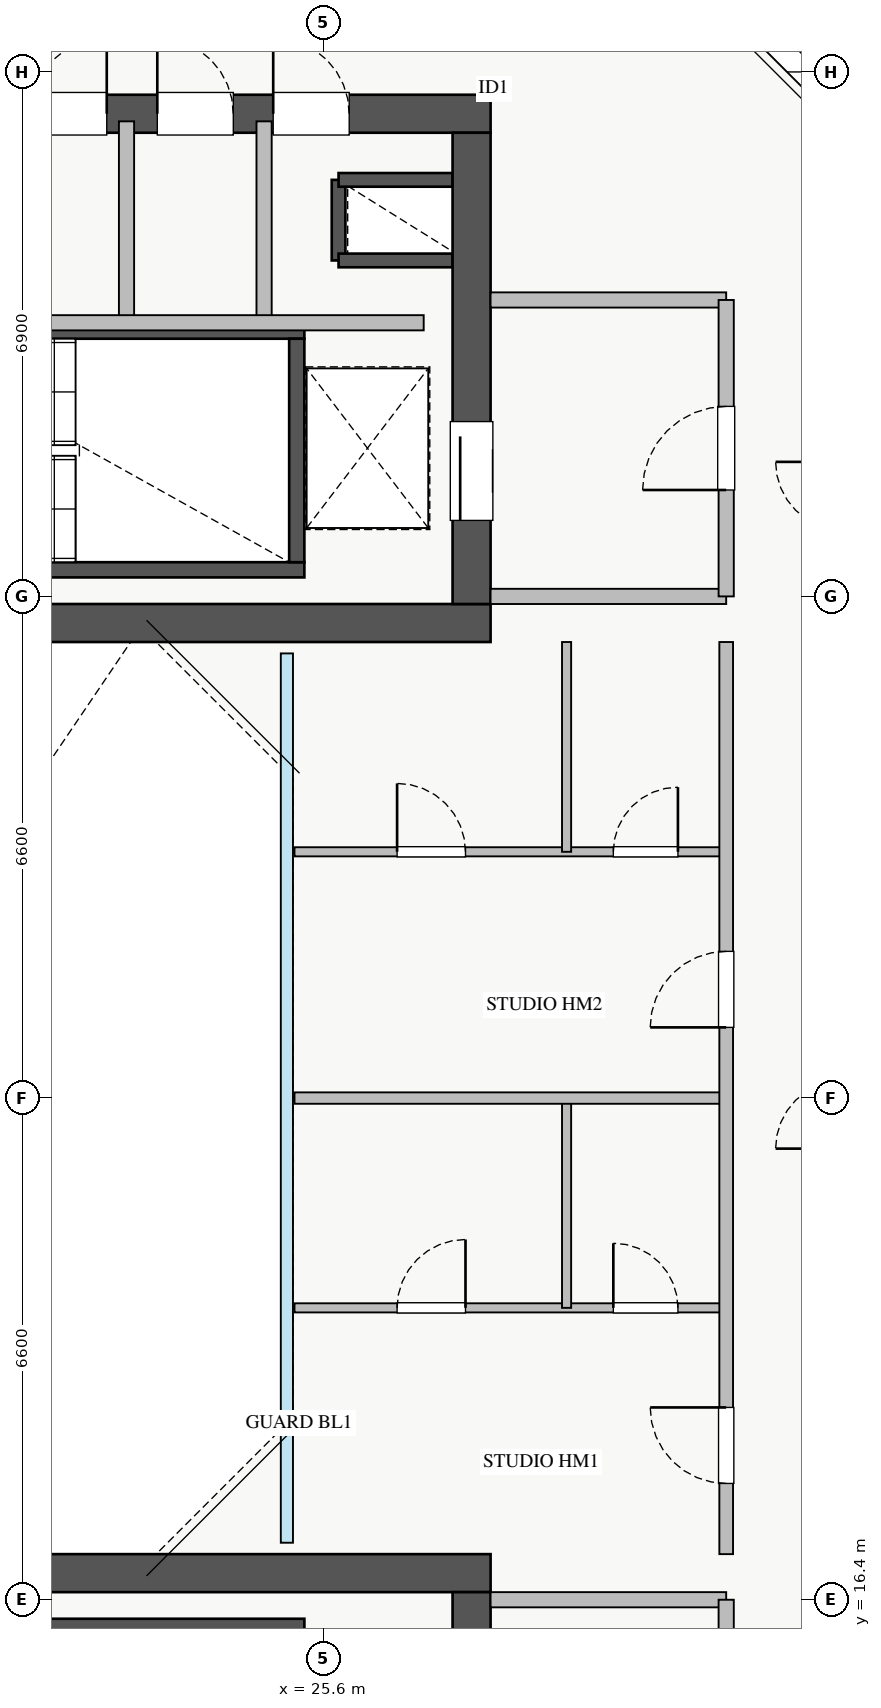
"""IFC4 building model, lengths in metres.
Left out: names, types, materials, properties, quantities, classifications, styles, units other than length and angle.
Written with IfcOpenShell. Run it as: python <this file> out.ifc"""

import sys

from ifc_helpers import new_model, si_unit, direction, frame, frame_2d, origin, place, context, subcontext, project, spatial, rectangle, extrude, source, transform, mapped, element, fill, save


model = new_model("IFC4")
c1 = context("Model", 3, precision=1e-05, world=origin(), true_north=direction((0.0, 1.0)))
c2 = subcontext(c1, "Body", "Model", "MODEL_VIEW")
j1 = project(units=[si_unit("LENGTHUNIT", "METRE"), si_unit("PLANEANGLEUNIT", "RADIAN")], contexts=[c1])
p1 = place(None, origin())
s1 = spatial("IfcSite", under=j1, at=p1, CompositionType="ELEMENT")
p2 = place(p1, origin())
s2 = spatial("IfcBuilding", under=s1, at=p2, CompositionType="ELEMENT")
p3 = place(p2, frame((0.0, 0.0, 203.5)))
s3 = spatial("IfcBuildingStorey", under=s2, at=p3, CompositionType="ELEMENT", Elevation=203.5)
p4 = place(p3, frame((25.8, 34.02, 0.0), z_axis=(0.0, 0.0, 1.0), x_axis=(0.0, 1.0, 0.0)))
e1 = element("IfcWall", 1, at=p4, inside=s3, PredefinedType="SHEAR", context=c2, shape_type="SweptSolid", body=[
    extrude(rectangle(XDim=1.06, YDim=0.18, at=frame_2d((0.53, 0.0))), origin(), (0.0, 0.0, 1.0), 3.07),
])
for number, where, z_axis, x_axis in (
    (2, (25.8, 35.08, 0.0), (0.0, 0.0, 1.0), (1.0, 0.0, 0.0)),
    (3, (25.8, 34.02, 0.0), (0.0, 0.0, 1.0), (1.0, 0.0, 0.0)),
):
    element("IfcWall", number, at=place(p3, frame(where, z_axis=z_axis, x_axis=x_axis)), inside=s3, PredefinedType="SHEAR", context=c2, shape_type="SweptSolid", body=[
        extrude(rectangle(XDim=1.5, YDim=0.18, at=frame_2d((0.75, 0.0))), origin(), (0.0, 0.0, 1.0), 3.07),
    ])
p5 = place(p3, frame((18.2, 29.95, 0.0), z_axis=(0.0, 0.0, 1.0), x_axis=(1.0, 0.0, 0.0)))
e4 = element("IfcWall", 4, at=p5, inside=s3, PredefinedType="SHEAR", context=c2, shape_type="SweptSolid", body=[
    extrude(rectangle(XDim=7.15, YDim=0.2, at=frame_2d((3.575, 0.0))), origin(), (0.0, 0.0, 1.0), 3.25),
])
p6 = place(p3, frame((18.2, 33.09, 0.0), z_axis=(0.0, 0.0, 1.0), x_axis=(1.0, 0.0, 0.0)))
e5 = element("IfcWall", 5, at=p6, inside=s3, PredefinedType="SHEAR", context=c2, shape_type="SweptSolid", body=[
    extrude(rectangle(XDim=7.15, YDim=0.2, at=frame_2d((3.575, 0.0))), origin(), (0.0, 0.0, 1.0), 3.25),
])
p7 = place(p6, frame((0.35, 0.0, 0.0)))
e6 = element("IfcOpeningElement", 6, at=p7, cuts=e5, PredefinedType="OPENING", context=c2, shape_type="SweptSolid", body=[
    extrude(rectangle(XDim=1.1, YDim=2.05, at=frame_2d((0.55, 1.025))), frame((0.0, 0.11, 0.0), z_axis=(0.0, -1.0, 0.0), x_axis=(1.0, 0.0, 0.0)), (0.0, 0.0, 1.0), 0.22),
])
p8 = place(p3, frame((25.25, 30.05, 0.0), z_axis=(0.0, 0.0, 1.0), x_axis=(0.0, 1.0, 0.0)))
e7 = element("IfcWall", 7, at=p8, inside=s3, PredefinedType="SHEAR", context=c2, shape_type="SweptSolid", body=[
    extrude(rectangle(XDim=2.94, YDim=0.2, at=frame_2d((1.47, 0.0))), origin(), (0.0, 0.0, 1.0), 3.25),
])
p9 = place(p3, frame((18.2, 16.05, 0.0), z_axis=(0.0, 0.0, 1.0), x_axis=(1.0, 0.0, 0.0)))
e8 = element("IfcWall", 8, at=p9, inside=s3, PredefinedType="SHEAR", context=c2, shape_type="SweptSolid", body=[
    extrude(rectangle(XDim=7.15, YDim=0.2, at=frame_2d((3.575, 0.0))), origin(), (0.0, 0.0, 1.0), 3.25),
])
p10 = place(p3, frame((10.2, 29.25, 0.0), z_axis=(0.0, 0.0, 1.0), x_axis=(1.0, 0.0, 0.0)))
e9 = element("IfcWall", 9, at=p10, inside=s3, PredefinedType="SHEAR", context=c2, shape_type="SweptSolid", body=[
    extrude(rectangle(XDim=17.6, YDim=0.5, at=frame_2d((8.8, 0.0))), origin(), (0.0, 0.0, 1.0), 3.25),
])
p11 = place(p3, frame((10.2, 35.95, 0.0), z_axis=(0.0, 0.0, 1.0), x_axis=(1.0, 0.0, 0.0)))
e10 = element("IfcWall", 10, at=p11, inside=s3, PredefinedType="SHEAR", context=c2, shape_type="SweptSolid", body=[
    extrude(rectangle(XDim=17.6, YDim=0.5, at=frame_2d((8.8, 0.0))), origin(), (0.0, 0.0, 1.0), 3.25),
])
p12 = place(p11, frame((1.15, 0.0, 0.0)))
e11 = element("IfcOpeningElement", 11, at=p12, cuts=e10, PredefinedType="OPENING", context=c2, shape_type="SweptSolid", body=[
    extrude(rectangle(XDim=1.1, YDim=2.05, at=frame_2d((0.55, 1.025))), frame((0.0, 0.26, 0.0), z_axis=(0.0, -1.0, 0.0), x_axis=(1.0, 0.0, 0.0)), (0.0, 0.0, 1.0), 0.52),
])
p13 = place(p11, frame((8.3, 0.0, 0.0)))
e12 = element("IfcOpeningElement", 12, at=p13, cuts=e10, PredefinedType="OPENING", context=c2, shape_type="SweptSolid", body=[
    extrude(rectangle(XDim=1.1, YDim=2.05, at=frame_2d((0.55, 1.025))), frame((0.0, 0.26, 0.0), z_axis=(0.0, -1.0, 0.0), x_axis=(1.0, 0.0, 0.0)), (0.0, 0.0, 1.0), 0.52),
])
p14 = place(p11, frame((2.85, 0.0, 0.0)))
e13 = element("IfcOpeningElement", 13, at=p14, cuts=e10, PredefinedType="OPENING", context=c2, shape_type="SweptSolid", body=[
    extrude(rectangle(XDim=1.1, YDim=2.05, at=frame_2d((0.55, 1.025))), frame((0.0, 0.26, 0.0), z_axis=(0.0, -1.0, 0.0), x_axis=(1.0, 0.0, 0.0)), (0.0, 0.0, 1.0), 0.52),
])
p15 = place(p11, frame((5.8, 0.0, 0.0)))
e14 = element("IfcOpeningElement", 14, at=p15, cuts=e10, PredefinedType="OPENING", context=c2, shape_type="SweptSolid", body=[
    extrude(rectangle(XDim=1.0, YDim=2.05, at=frame_2d((0.5, 1.025))), frame((0.0, 0.26, 0.0), z_axis=(0.0, -1.0, 0.0), x_axis=(1.0, 0.0, 0.0)), (0.0, 0.0, 1.0), 0.52),
])
p16 = place(p11, frame((14.74, 0.0, 0.0)))
e15 = element("IfcOpeningElement", 15, at=p16, cuts=e10, PredefinedType="OPENING", context=c2, shape_type="SweptSolid", body=[
    extrude(rectangle(XDim=1.0, YDim=2.05, at=frame_2d((0.5, 1.025))), frame((0.0, 0.26, 0.0), z_axis=(0.0, -1.0, 0.0), x_axis=(1.0, 0.0, 0.0)), (0.0, 0.0, 1.0), 0.52),
])
p17 = place(p11, frame((10.005, 0.0, 0.0)))
e16 = element("IfcOpeningElement", 16, at=p17, cuts=e10, PredefinedType="OPENING", context=c2, shape_type="SweptSolid", body=[
    extrude(rectangle(XDim=1.0, YDim=2.05, at=frame_2d((0.5, 1.025))), frame((0.0, 0.26, 0.0), z_axis=(0.0, -1.0, 0.0), x_axis=(1.0, 0.0, 0.0)), (0.0, 0.0, 1.0), 0.52),
])
p18 = place(p11, frame((11.55, 0.0, 0.0)))
e17 = element("IfcOpeningElement", 17, at=p18, cuts=e10, PredefinedType="OPENING", context=c2, shape_type="SweptSolid", body=[
    extrude(rectangle(XDim=1.0, YDim=2.05, at=frame_2d((0.5, 1.025))), frame((0.0, 0.26, 0.0), z_axis=(0.0, -1.0, 0.0), x_axis=(1.0, 0.0, 0.0)), (0.0, 0.0, 1.0), 0.52),
])
p19 = place(p11, frame((13.215, 0.0, 0.0)))
e18 = element("IfcOpeningElement", 18, at=p19, cuts=e10, PredefinedType="OPENING", context=c2, shape_type="SweptSolid", body=[
    extrude(rectangle(XDim=1.0, YDim=2.05, at=frame_2d((0.5, 1.025))), frame((0.0, 0.26, 0.0), z_axis=(0.0, -1.0, 0.0), x_axis=(1.0, 0.0, 0.0)), (0.0, 0.0, 1.0), 0.52),
])
p20 = place(p3, frame((27.55, 29.5, 0.0), z_axis=(0.0, 0.0, 1.0), x_axis=(0.0, 1.0, 0.0)))
e19 = element("IfcWall", 19, at=p20, inside=s3, PredefinedType="SHEAR", context=c2, shape_type="SweptSolid", body=[
    extrude(rectangle(XDim=6.2, YDim=0.5, at=frame_2d((3.1, 0.0))), origin(), (0.0, 0.0, 1.0), 3.25),
])
p21 = place(p20, frame((1.1, 0.0, 0.0)))
e20 = element("IfcOpeningElement", 20, at=p21, cuts=e19, PredefinedType="OPENING", context=c2, shape_type="SweptSolid", body=[
    extrude(rectangle(XDim=1.3, YDim=2.05, at=frame_2d((0.65, 1.025))), frame((0.0, 0.26, 0.0), z_axis=(0.0, -1.0, 0.0), x_axis=(1.0, 0.0, 0.0)), (0.0, 0.0, 1.0), 0.52),
])
p22 = place(p3, frame((10.2, 16.75, 0.0), z_axis=(0.0, 0.0, 1.0), x_axis=(1.0, 0.0, 0.0)))
e21 = element("IfcWall", 21, at=p22, inside=s3, PredefinedType="SHEAR", context=c2, shape_type="SweptSolid", body=[
    extrude(rectangle(XDim=17.6, YDim=0.5, at=frame_2d((8.8, 0.0))), origin(), (0.0, 0.0, 1.0), 3.25),
])
p23 = place(p3, frame((27.55, 10.3, 0.0), z_axis=(0.0, 0.0, 1.0), x_axis=(0.0, 1.0, 0.0)))
e22 = element("IfcWall", 22, at=p23, inside=s3, PredefinedType="SHEAR", context=c2, shape_type="SweptSolid", body=[
    extrude(rectangle(XDim=6.2, YDim=0.5, at=frame_2d((3.1, 0.0))), origin(), (0.0, 0.0, 1.0), 3.25),
])
p24 = place(p23, frame((2.1, 0.0, 0.0)))
e23 = element("IfcOpeningElement", 23, at=p24, cuts=e22, PredefinedType="OPENING", context=c2, shape_type="SweptSolid", body=[
    extrude(rectangle(XDim=1.3, YDim=2.05, at=frame_2d((0.65, 1.025))), frame((0.0, 0.26, 0.0), z_axis=(0.0, -1.0, 0.0), x_axis=(1.0, 0.0, 0.0)), (0.0, 0.0, 1.0), 0.52),
])
p25 = place(p3, frame((27.8, 29.6, 0.0), z_axis=(0.0, 0.0, 1.0), x_axis=(1.0, 0.0, 0.0)))
e24 = element("IfcWall", 24, at=p25, inside=s3, PredefinedType="PARTITIONING", context=c2, shape_type="SweptSolid", body=[
    extrude(rectangle(XDim=3.1, YDim=0.2, at=frame_2d((1.55, 0.0))), origin(), (0.0, 0.0, 1.0), 3.07),
])
p26 = place(p3, frame((27.8, 33.5, 0.0), z_axis=(0.0, 0.0, 1.0), x_axis=(1.0, 0.0, 0.0)))
e25 = element("IfcWall", 25, at=p26, inside=s3, PredefinedType="PARTITIONING", context=c2, shape_type="SweptSolid", body=[
    extrude(rectangle(XDim=3.1, YDim=0.2, at=frame_2d((1.55, 0.0))), origin(), (0.0, 0.0, 1.0), 2.265),
])
p27 = place(p3, frame((30.9, 29.6, 0.0), z_axis=(0.0, 0.0, 1.0), x_axis=(0.0, 1.0, 0.0)))
e26 = element("IfcWall", 26, at=p27, inside=s3, PredefinedType="PARTITIONING", context=c2, shape_type="SweptSolid", body=[
    extrude(rectangle(XDim=3.9, YDim=0.2, at=frame_2d((1.95, 0.0))), origin(), (0.0, 0.0, 1.0), 3.07),
])
p28 = place(p27, frame((1.4, 0.0, 0.0)))
e27 = element("IfcOpeningElement", 27, at=p28, cuts=e26, PredefinedType="OPENING", context=c2, shape_type="SweptSolid", body=[
    extrude(rectangle(XDim=1.1, YDim=2.05, at=frame_2d((0.55, 1.025))), frame((0.0, 0.11, 0.0), z_axis=(0.0, -1.0, 0.0), x_axis=(1.0, 0.0, 0.0)), (0.0, 0.0, 1.0), 0.22),
])
p29 = place(p3, frame((27.8, 16.4, 0.0), z_axis=(0.0, 0.0, 1.0), x_axis=(1.0, 0.0, 0.0)))
e28 = element("IfcWall", 28, at=p29, inside=s3, PredefinedType="PARTITIONING", context=c2, shape_type="SweptSolid", body=[
    extrude(rectangle(XDim=3.1, YDim=0.2, at=frame_2d((1.55, 0.0))), origin(), (0.0, 0.0, 1.0), 3.07),
])
p30 = place(p3, frame((30.9, 12.5, 0.0), z_axis=(0.0, 0.0, 1.0), x_axis=(0.0, 1.0, 0.0)))
e29 = element("IfcWall", 29, at=p30, inside=s3, PredefinedType="PARTITIONING", context=c2, shape_type="SweptSolid", body=[
    extrude(rectangle(XDim=3.9, YDim=0.2, at=frame_2d((1.95, 0.0))), origin(), (0.0, 0.0, 1.0), 3.07),
])
p31 = place(p30, frame((1.4, 0.0, 0.0)))
e30 = element("IfcOpeningElement", 30, at=p31, cuts=e29, PredefinedType="OPENING", context=c2, shape_type="SweptSolid", body=[
    extrude(rectangle(XDim=1.1, YDim=2.05, at=frame_2d((0.55, 1.025))), frame((0.0, 0.11, 0.0), z_axis=(0.0, -1.0, 0.0), x_axis=(1.0, 0.0, 0.0)), (0.0, 0.0, 1.0), 0.22),
])
for number, where, z_axis, x_axis in (
    (31, (24.82, 33.2, 0.0), (0.0, 0.0, 1.0), (0.0, 1.0, 0.0)),
    (32, (23.01, 33.2, 0.0), (0.0, 0.0, 1.0), (0.0, 1.0, 0.0)),
):
    element("IfcWall", number, at=place(p3, frame(where, z_axis=z_axis, x_axis=x_axis)), inside=s3, PredefinedType="PARTITIONING", context=c2, shape_type="SweptSolid", body=[
        extrude(rectangle(XDim=2.65, YDim=0.2, at=frame_2d((1.325, 0.0))), origin(), (0.0, 0.0, 1.0), 3.07),
    ])
p32 = place(p3, frame((21.75, 33.2, 0.0), z_axis=(0.0, 0.0, 1.0), x_axis=(1.0, 0.0, 0.0)))
e33 = element("IfcWall", 33, at=p32, inside=s3, PredefinedType="PARTITIONING", context=c2, shape_type="SweptSolid", body=[
    extrude(rectangle(XDim=5.17, YDim=0.2, at=frame_2d((2.585, 0.0))), origin(), (0.0, 0.0, 1.0), 3.07),
])
p33 = place(p3, frame((25.22, 20.24, 0.0), z_axis=(0.0, 0.0, 1.0), x_axis=(1.0, 0.0, 0.0)))
e34 = element("IfcWall", 34, at=p33, inside=s3, PredefinedType="PLUMBINGWALL", context=c2, shape_type="SweptSolid", body=[
    extrude(rectangle(XDim=5.68, YDim=0.12, at=frame_2d((2.84, 0.0))), origin(), (0.0, 0.0, 1.0), 2.675),
])
p34 = place(p33, frame((1.35, 0.0, 0.0)))
e35 = element("IfcOpeningElement", 35, at=p34, cuts=e34, PredefinedType="OPENING", context=c2, shape_type="SweptSolid", body=[
    extrude(rectangle(XDim=0.9, YDim=2.05, at=frame_2d((0.45, 1.025))), frame((0.0, 0.07, 0.0), z_axis=(0.0, -1.0, 0.0), x_axis=(1.0, 0.0, 0.0)), (0.0, 0.0, 1.0), 0.14),
])
p35 = place(p33, frame((4.195, 0.0, 0.0)))
e36 = element("IfcOpeningElement", 36, at=p35, cuts=e34, PredefinedType="OPENING", context=c2, shape_type="SweptSolid", body=[
    extrude(rectangle(XDim=0.85, YDim=2.05, at=frame_2d((0.425, 1.025))), frame((0.0, 0.07, 0.0), z_axis=(0.0, -1.0, 0.0), x_axis=(1.0, 0.0, 0.0)), (0.0, 0.0, 1.0), 0.14),
])
p36 = place(p3, frame((28.8, 20.24, 0.0), z_axis=(0.0, 0.0, 1.0), x_axis=(0.0, 1.0, 0.0)))
e37 = element("IfcWall", 37, at=p36, inside=s3, PredefinedType="PLUMBINGWALL", context=c2, shape_type="SweptSolid", body=[
    extrude(rectangle(XDim=2.76, YDim=0.12, at=frame_2d((1.38, 0.0))), origin(), (0.0, 0.0, 1.0), 3.07),
])
p37 = place(p3, frame((25.22, 26.24, 0.0), z_axis=(0.0, 0.0, 1.0), x_axis=(1.0, 0.0, 0.0)))
e38 = element("IfcWall", 38, at=p37, inside=s3, PredefinedType="PLUMBINGWALL", context=c2, shape_type="SweptSolid", body=[
    extrude(rectangle(XDim=5.68, YDim=0.12, at=frame_2d((2.84, 0.0))), origin(), (0.0, 0.0, 1.0), 2.675),
])
p38 = place(p37, frame((1.35, 0.0, 0.0)))
e39 = element("IfcOpeningElement", 39, at=p38, cuts=e38, PredefinedType="OPENING", context=c2, shape_type="SweptSolid", body=[
    extrude(rectangle(XDim=0.9, YDim=2.05, at=frame_2d((0.45, 1.025))), frame((0.0, 0.07, 0.0), z_axis=(0.0, -1.0, 0.0), x_axis=(1.0, 0.0, 0.0)), (0.0, 0.0, 1.0), 0.14),
])
p39 = place(p37, frame((4.195, 0.0, 0.0)))
e40 = element("IfcOpeningElement", 40, at=p39, cuts=e38, PredefinedType="OPENING", context=c2, shape_type="SweptSolid", body=[
    extrude(rectangle(XDim=0.85, YDim=2.05, at=frame_2d((0.425, 1.025))), frame((0.0, 0.07, 0.0), z_axis=(0.0, -1.0, 0.0), x_axis=(1.0, 0.0, 0.0)), (0.0, 0.0, 1.0), 0.14),
])
p40 = place(p3, frame((28.8, 26.24, 0.0), z_axis=(0.0, 0.0, 1.0), x_axis=(0.0, 1.0, 0.0)))
e41 = element("IfcWall", 41, at=p40, inside=s3, PredefinedType="PLUMBINGWALL", context=c2, shape_type="SweptSolid", body=[
    extrude(rectangle(XDim=2.76, YDim=0.12, at=frame_2d((1.38, 0.0))), origin(), (0.0, 0.0, 1.0), 3.07),
])
p41 = place(p3, frame((25.22, 23.0, 0.0), z_axis=(0.0, 0.0, 1.0), x_axis=(1.0, 0.0, 0.0)))
e42 = element("IfcWall", 42, at=p41, inside=s3, PredefinedType="PARTITIONING", context=c2, shape_type="SweptSolid", body=[
    extrude(rectangle(XDim=5.68, YDim=0.15, at=frame_2d((2.84, 0.0))), origin(), (0.0, 0.0, 1.0), 3.07),
])
p42 = place(p3, frame((30.9, 17.0, 0.0), z_axis=(0.0, 0.0, 1.0), x_axis=(0.0, 1.0, 0.0)))
e43 = element("IfcWall", 43, at=p42, inside=s3, PredefinedType="PARTITIONING", context=c2, shape_type="SweptSolid", body=[
    extrude(rectangle(XDim=12.0, YDim=0.18, at=frame_2d((6.0, 0.0))), origin(), (0.0, 0.0, 1.0), 3.07),
])
p43 = place(p42, frame((0.93, 0.0, 0.0)))
e44 = element("IfcOpeningElement", 44, at=p43, cuts=e43, PredefinedType="OPENING", context=c2, shape_type="SweptSolid", body=[
    extrude(rectangle(XDim=1.0, YDim=2.05, at=frame_2d((0.5, 1.025))), frame((0.0, 0.1, 0.0), z_axis=(0.0, -1.0, 0.0), x_axis=(1.0, 0.0, 0.0)), (0.0, 0.0, 1.0), 0.2),
])
p44 = place(p42, frame((6.93, 0.0, 0.0)))
e45 = element("IfcOpeningElement", 45, at=p44, cuts=e43, PredefinedType="OPENING", context=c2, shape_type="SweptSolid", body=[
    extrude(rectangle(XDim=1.0, YDim=2.05, at=frame_2d((0.5, 1.025))), frame((0.0, 0.1, 0.0), z_axis=(0.0, -1.0, 0.0), x_axis=(1.0, 0.0, 0.0)), (0.0, 0.0, 1.0), 0.2),
])
m1 = source(origin(), c2, "Body", "SweptSolid", [
    extrude(rectangle(XDim=1.3, YDim=2.05, at=frame_2d((0.65, 1.025))), frame((0.0, 0.025, 0.0), z_axis=(0.0, -1.0, 0.0), x_axis=(1.0, 0.0, 0.0)), (0.0, 0.0, 1.0), 0.05),
])
p45 = place(p21, origin())
e46 = element("IfcDoor", 46, at=p45, inside=s3, OperationType="SLIDING_TO_LEFT", PredefinedType="DOOR", context=c2, shape_type="MappedRepresentation", body=[
    mapped(m1, transform((0.0, 0.0, 0.0), x_axis=(1.0, 0.0, 0.0), y_axis=(0.0, 1.0, 0.0), z_axis=(0.0, 0.0, 1.0), scale=1.0)),
])
fill(e20, e46)
m2 = source(origin(), c2, "Body", "SweptSolid", [
    extrude(rectangle(XDim=1.0, YDim=2.05, at=frame_2d((0.5, 1.025))), frame((0.0, 0.025, 0.0), z_axis=(0.0, -1.0, 0.0), x_axis=(1.0, 0.0, 0.0)), (0.0, 0.0, 1.0), 0.05),
])
p46 = place(p16, origin())
e47 = element("IfcDoor", 47, at=p46, inside=s3, OperationType="SINGLE_SWING_LEFT", PredefinedType="DOOR", context=c2, shape_type="MappedRepresentation", body=[
    mapped(m2, transform((0.0, 0.0, 0.0), x_axis=(1.0, 0.0, 0.0), y_axis=(0.0, 1.0, 0.0), z_axis=(0.0, 0.0, 1.0), scale=1.0)),
])
fill(e15, e47)
p47 = place(p18, origin())
e48 = element("IfcDoor", 48, at=p47, inside=s3, OperationType="SINGLE_SWING_RIGHT", PredefinedType="DOOR", context=c2, shape_type="MappedRepresentation", body=[
    mapped(m2, transform((0.0, 0.0, 0.0), x_axis=(1.0, 0.0, 0.0), y_axis=(0.0, 1.0, 0.0), z_axis=(0.0, 0.0, 1.0), scale=1.0)),
])
fill(e17, e48)
p48 = place(p19, origin())
e49 = element("IfcDoor", 49, at=p48, inside=s3, OperationType="SINGLE_SWING_LEFT", PredefinedType="DOOR", context=c2, shape_type="MappedRepresentation", body=[
    mapped(m2, transform((0.0, 0.0, 0.0), x_axis=(1.0, 0.0, 0.0), y_axis=(0.0, 1.0, 0.0), z_axis=(0.0, 0.0, 1.0), scale=1.0)),
])
fill(e18, e49)
m3 = source(origin(), c2, "Body", "SweptSolid", [
    extrude(rectangle(XDim=1.1, YDim=2.05, at=frame_2d((0.55, 1.025))), frame((0.0, 0.025, 0.0), z_axis=(0.0, -1.0, 0.0), x_axis=(1.0, 0.0, 0.0)), (0.0, 0.0, 1.0), 0.05),
])
p49 = place(p28, origin())
e50 = element("IfcDoor", 50, at=p49, inside=s3, OperationType="SINGLE_SWING_LEFT", PredefinedType="DOOR", context=c2, shape_type="MappedRepresentation", body=[
    mapped(m3, transform((0.0, 0.0, 0.0), x_axis=(1.0, 0.0, 0.0), y_axis=(0.0, 1.0, 0.0), z_axis=(0.0, 0.0, 1.0), scale=1.0)),
])
fill(e27, e50)
m4 = source(origin(), c2, "Body", "SweptSolid", [
    extrude(rectangle(XDim=0.9, YDim=2.05, at=frame_2d((0.45, 1.025))), frame((0.0, 0.025, 0.0), z_axis=(0.0, -1.0, 0.0), x_axis=(1.0, 0.0, 0.0)), (0.0, 0.0, 1.0), 0.05),
])
p50 = place(p34, origin())
e51 = element("IfcDoor", 51, at=p50, inside=s3, OperationType="SINGLE_SWING_RIGHT", PredefinedType="DOOR", context=c2, shape_type="MappedRepresentation", body=[
    mapped(m4, transform((0.0, 0.0, 0.0), x_axis=(1.0, 0.0, 0.0), y_axis=(0.0, 1.0, 0.0), z_axis=(0.0, 0.0, 1.0), scale=1.0)),
])
fill(e35, e51)
m5 = source(origin(), c2, "Body", "SweptSolid", [
    extrude(rectangle(XDim=0.85, YDim=2.05, at=frame_2d((0.425, 1.025))), frame((0.0, 0.025, 0.0), z_axis=(0.0, -1.0, 0.0), x_axis=(1.0, 0.0, 0.0)), (0.0, 0.0, 1.0), 0.05),
])
p51 = place(p35, origin())
e52 = element("IfcDoor", 52, at=p51, inside=s3, OperationType="SINGLE_SWING_LEFT", PredefinedType="DOOR", context=c2, shape_type="MappedRepresentation", body=[
    mapped(m5, transform((0.0, 0.0, 0.0), x_axis=(1.0, 0.0, 0.0), y_axis=(0.0, 1.0, 0.0), z_axis=(0.0, 0.0, 1.0), scale=1.0)),
])
fill(e36, e52)
p52 = place(p38, origin())
e53 = element("IfcDoor", 53, at=p52, inside=s3, OperationType="SINGLE_SWING_LEFT", PredefinedType="DOOR", context=c2, shape_type="MappedRepresentation", body=[
    mapped(m4, transform((0.0, 0.0, 0.0), x_axis=(1.0, 0.0, 0.0), y_axis=(0.0, 1.0, 0.0), z_axis=(0.0, 0.0, 1.0), scale=1.0)),
])
fill(e39, e53)
p53 = place(p39, origin())
e54 = element("IfcDoor", 54, at=p53, inside=s3, OperationType="SINGLE_SWING_RIGHT", PredefinedType="DOOR", context=c2, shape_type="MappedRepresentation", body=[
    mapped(m5, transform((0.0, 0.0, 0.0), x_axis=(1.0, 0.0, 0.0), y_axis=(0.0, 1.0, 0.0), z_axis=(0.0, 0.0, 1.0), scale=1.0)),
])
fill(e40, e54)
p54 = place(p43, origin())
e55 = element("IfcDoor", 55, at=p54, inside=s3, OperationType="SINGLE_SWING_RIGHT", PredefinedType="DOOR", context=c2, shape_type="MappedRepresentation", body=[
    mapped(m2, transform((0.0, 0.0, 0.0), x_axis=(1.0, 0.0, 0.0), y_axis=(0.0, 1.0, 0.0), z_axis=(0.0, 0.0, 1.0), scale=1.0)),
])
fill(e44, e55)
p55 = place(p44, origin())
e56 = element("IfcDoor", 56, at=p55, inside=s3, OperationType="SINGLE_SWING_LEFT", PredefinedType="DOOR", context=c2, shape_type="MappedRepresentation", body=[
    mapped(m2, transform((0.0, 0.0, 0.0), x_axis=(1.0, 0.0, 0.0), y_axis=(0.0, 1.0, 0.0), z_axis=(0.0, 0.0, 1.0), scale=1.0)),
])
fill(e45, e56)
save(model, sys.argv[1])
